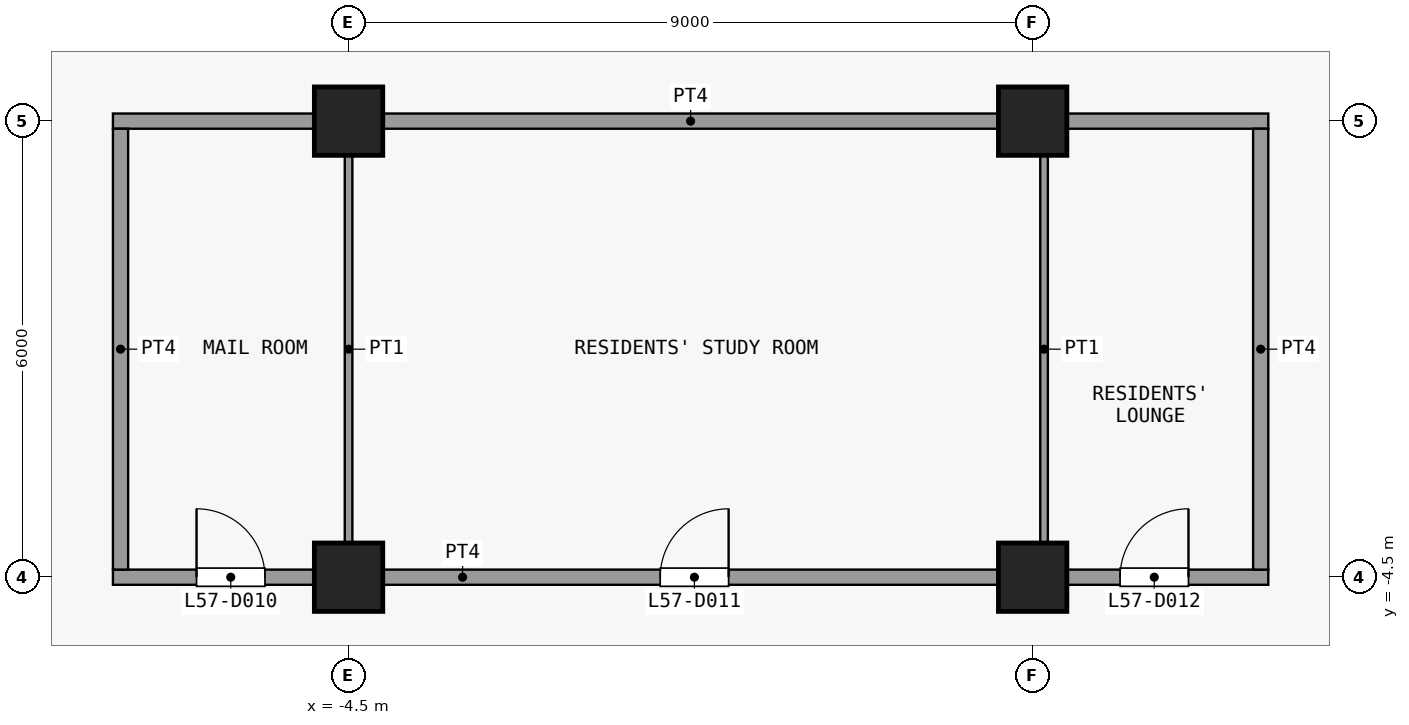
"""IFC4 building model, lengths in metres.
Left out: names, types, materials, properties, quantities, classifications, styles, units other than length and angle.
Written with IfcOpenShell. Run it as: python <this file> out.ifc"""

import sys

from ifc_helpers import new_model, si_unit, direction, frame, frame_2d, origin, origin_2d, place, context, subcontext, project, spatial, rectangle, extrude, element, fill, save


model = new_model("IFC4")
c1 = context("Model", 3, precision=1e-05, world=origin(), true_north=direction((0.0, 1.0)))
c2 = subcontext(c1, "Body", "Model", "MODEL_VIEW")
j1 = project(units=[si_unit("LENGTHUNIT", "METRE"), si_unit("PLANEANGLEUNIT", "RADIAN")], contexts=[c1])
p1 = place(None, origin())
s1 = spatial("IfcSite", under=j1, at=p1, CompositionType="ELEMENT")
p2 = place(p1, origin())
s2 = spatial("IfcBuilding", under=s1, at=p2, CompositionType="ELEMENT")
p3 = place(p2, frame((0.0, 0.0, 226.7)))
s3 = spatial("IfcBuildingStorey", under=s2, at=p3, CompositionType="ELEMENT", Elevation=226.7)
for number, where, z_axis, x_axis in (
    (1, (-4.5, -4.5, 0.0), (0.0, 0.0, 1.0), (1.0, 0.0, 0.0)),
    (2, (-4.5, 1.5, 0.0), (0.0, 0.0, 1.0), (1.0, 0.0, 0.0)),
    (3, (4.5, -4.5, 0.0), (0.0, 0.0, 1.0), (1.0, 0.0, 0.0)),
    (4, (4.5, 1.5, 0.0), (0.0, 0.0, 1.0), (1.0, 0.0, 0.0)),
):
    element("IfcColumn", number, at=place(p3, frame(where, z_axis=z_axis, x_axis=x_axis)), inside=s3, PredefinedType="COLUMN", context=c2, shape_type="SweptSolid", body=[
        extrude(rectangle(XDim=0.9, YDim=0.9, at=origin_2d()), origin(), (0.0, 0.0, 1.0), 3.6),
    ])
p4 = place(p3, frame((-7.6, -4.5, 0.0), z_axis=(0.0, 0.0, 1.0), x_axis=(1.0, 0.0, 0.0)))
e5 = element("IfcWall", 5, at=p4, inside=s3, PredefinedType="PARTITIONING", context=c2, shape_type="SweptSolid", body=[
    extrude(rectangle(XDim=15.2, YDim=0.2, at=frame_2d((7.6, 0.0))), origin(), (0.0, 0.0, 1.0), 3.3),
])
p5 = place(p4, frame((1.1, 0.0, 0.0)))
e6 = element("IfcOpeningElement", 6, at=p5, cuts=e5, PredefinedType="OPENING", context=c2, shape_type="SweptSolid", body=[
    extrude(rectangle(XDim=0.9, YDim=2.1, at=frame_2d((0.45, 1.05))), frame((0.0, 0.11, 0.0), z_axis=(0.0, -1.0, 0.0), x_axis=(1.0, 0.0, 0.0)), (0.0, 0.0, 1.0), 0.22),
])
p6 = place(p4, frame((7.2, 0.0, 0.0)))
e7 = element("IfcOpeningElement", 7, at=p6, cuts=e5, PredefinedType="OPENING", context=c2, shape_type="SweptSolid", body=[
    extrude(rectangle(XDim=0.9, YDim=2.1, at=frame_2d((0.45, 1.05))), frame((0.0, 0.11, 0.0), z_axis=(0.0, -1.0, 0.0), x_axis=(1.0, 0.0, 0.0)), (0.0, 0.0, 1.0), 0.22),
])
p7 = place(p4, frame((13.25, 0.0, 0.0)))
e8 = element("IfcOpeningElement", 8, at=p7, cuts=e5, PredefinedType="OPENING", context=c2, shape_type="SweptSolid", body=[
    extrude(rectangle(XDim=0.9, YDim=2.1, at=frame_2d((0.45, 1.05))), frame((0.0, 0.11, 0.0), z_axis=(0.0, -1.0, 0.0), x_axis=(1.0, 0.0, 0.0)), (0.0, 0.0, 1.0), 0.22),
])
p8 = place(p3, frame((-7.6, 1.5, 0.0), z_axis=(0.0, 0.0, 1.0), x_axis=(1.0, 0.0, 0.0)))
e9 = element("IfcWall", 9, at=p8, inside=s3, PredefinedType="PARTITIONING", context=c2, shape_type="SweptSolid", body=[
    extrude(rectangle(XDim=15.2, YDim=0.2, at=frame_2d((7.6, 0.0))), origin(), (0.0, 0.0, 1.0), 3.3),
])
p9 = place(p3, frame((-7.5, -4.4, 0.0), z_axis=(0.0, 0.0, 1.0), x_axis=(0.0, 1.0, 0.0)))
e10 = element("IfcWall", 10, at=p9, inside=s3, PredefinedType="PARTITIONING", context=c2, shape_type="SweptSolid", body=[
    extrude(rectangle(XDim=5.8, YDim=0.2, at=frame_2d((2.9, 0.0))), origin(), (0.0, 0.0, 1.0), 3.3),
])
for number, where, z_axis, x_axis in (
    (11, (-4.5, -4.4, 0.0), (0.0, 0.0, 1.0), (0.0, 1.0, 0.0)),
    (12, (4.65, -4.4, 0.0), (0.0, 0.0, 1.0), (0.0, 1.0, 0.0)),
):
    element("IfcWall", number, at=place(p3, frame(where, z_axis=z_axis, x_axis=x_axis)), inside=s3, PredefinedType="PARTITIONING", context=c2, shape_type="SweptSolid", body=[
        extrude(rectangle(XDim=5.8, YDim=0.1, at=frame_2d((2.9, 0.0))), origin(), (0.0, 0.0, 1.0), 3.3),
    ])
p10 = place(p3, frame((7.5, -4.4, 0.0), z_axis=(0.0, 0.0, 1.0), x_axis=(0.0, 1.0, 0.0)))
e13 = element("IfcWall", 13, at=p10, inside=s3, PredefinedType="PARTITIONING", context=c2, shape_type="SweptSolid", body=[
    extrude(rectangle(XDim=5.8, YDim=0.2, at=frame_2d((2.9, 0.0))), origin(), (0.0, 0.0, 1.0), 3.3),
])
p11 = place(p5, origin())
e14 = element("IfcDoor", 14, at=p11, inside=s3, OperationType="SINGLE_SWING_RIGHT", PredefinedType="DOOR", context=c2, shape_type="SweptSolid", body=[
    extrude(rectangle(XDim=0.9, YDim=2.1, at=frame_2d((0.45, 1.05))), frame((0.0, 0.025, 0.0), z_axis=(0.0, -1.0, 0.0), x_axis=(1.0, 0.0, 0.0)), (0.0, 0.0, 1.0), 0.05),
])
fill(e6, e14)
p12 = place(p6, origin())
e15 = element("IfcDoor", 15, at=p12, inside=s3, OperationType="SINGLE_SWING_LEFT", PredefinedType="DOOR", context=c2, shape_type="SweptSolid", body=[
    extrude(rectangle(XDim=0.9, YDim=2.1, at=frame_2d((0.45, 1.05))), frame((0.0, 0.025, 0.0), z_axis=(0.0, -1.0, 0.0), x_axis=(1.0, 0.0, 0.0)), (0.0, 0.0, 1.0), 0.05),
])
fill(e7, e15)
p13 = place(p7, origin())
e16 = element("IfcDoor", 16, at=p13, inside=s3, OperationType="SINGLE_SWING_LEFT", PredefinedType="DOOR", context=c2, shape_type="SweptSolid", body=[
    extrude(rectangle(XDim=0.9, YDim=2.1, at=frame_2d((0.45, 1.05))), frame((0.0, 0.025, 0.0), z_axis=(0.0, -1.0, 0.0), x_axis=(1.0, 0.0, 0.0)), (0.0, 0.0, 1.0), 0.05),
])
fill(e8, e16)
save(model, sys.argv[1])
